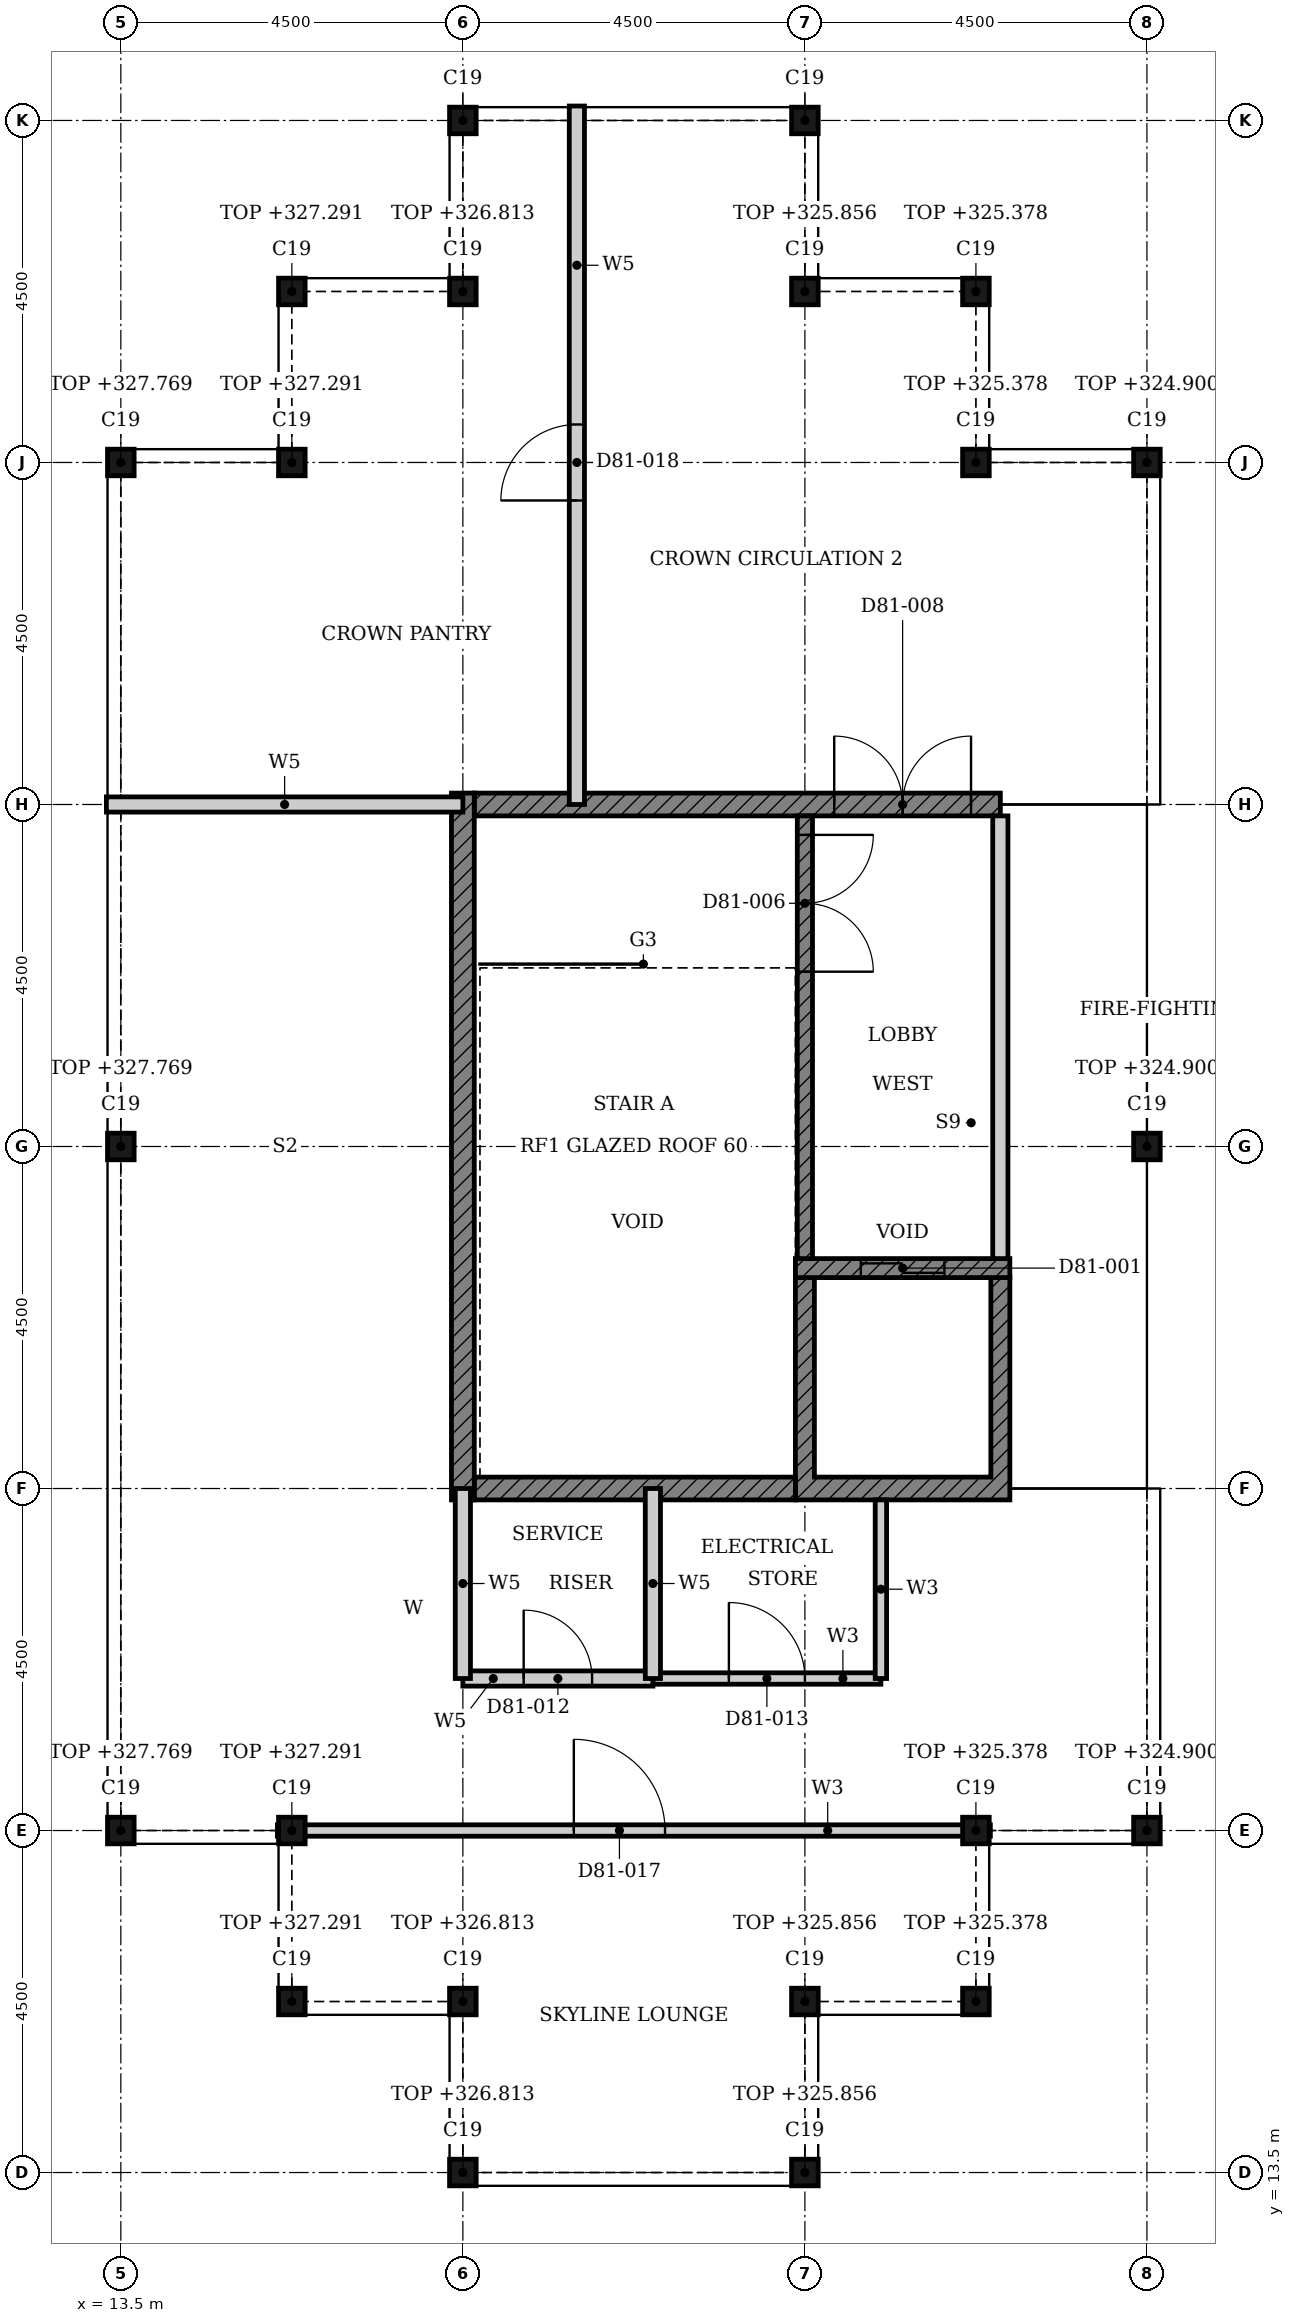
"""IFC4 building model, lengths in metres.
Left out: names, types, materials, properties, quantities, classifications, styles, units other than length and angle.
Written with IfcOpenShell. Run it as: python <this file> out.ifc"""

import sys

from ifc_helpers import new_model, si_unit, direction, frame, frame_2d, origin, origin_2d, place, context, subcontext, project, spatial, polyline, rectangle, i_section, outline, extrude, element, fill, save


model = new_model("IFC4")
c1 = context("Model", 3, precision=1e-05, world=origin(), true_north=direction((0.0, 1.0)))
c2 = subcontext(c1, "Body", "Model", "MODEL_VIEW")
j1 = project(units=[si_unit("LENGTHUNIT", "METRE"), si_unit("PLANEANGLEUNIT", "RADIAN")], contexts=[c1])
p1 = place(None, origin())
s1 = spatial("IfcSite", under=j1, at=p1, CompositionType="ELEMENT")
p2 = place(p1, origin())
s2 = spatial("IfcBuilding", under=s1, at=p2, CompositionType="ELEMENT")
p3 = place(p2, frame((0.0, 0.0, 321.2)))
s3 = spatial("IfcBuildingStorey", under=s2, at=p3, CompositionType="ELEMENT", Elevation=321.2)
for number, where, z_axis, x_axis in (
    (1, (22.5, 13.5, 0.0), (0.0, 0.0, 1.0), (1.0, 0.0, 0.0)),
    (2, (22.5, 15.75, 0.0), (0.0, 0.0, 1.0), (1.0, 0.0, 0.0)),
):
    element("IfcColumn", number, at=place(p3, frame(where, z_axis=z_axis, x_axis=x_axis)), inside=s3, PredefinedType="COLUMN", context=c2, shape_type="SweptSolid", body=[
        extrude(i_section(OverallWidth=0.35, OverallDepth=0.35, WebThickness=0.012, FlangeThickness=0.019, FilletRadius=0.013, at=origin_2d()), origin(), (0.0, 0.0, 1.0), 4.656),
    ])
for number, where, z_axis, x_axis in (
    (3, (24.75, 15.75, 0.0), (0.0, 0.0, 1.0), (1.0, 0.0, 0.0)),
    (4, (24.75, 18.0, 0.0), (0.0, 0.0, 1.0), (1.0, 0.0, 0.0)),
):
    element("IfcColumn", number, at=place(p3, frame(where, z_axis=z_axis, x_axis=x_axis)), inside=s3, PredefinedType="COLUMN", context=c2, shape_type="SweptSolid", body=[
        extrude(i_section(OverallWidth=0.35, OverallDepth=0.35, WebThickness=0.012, FlangeThickness=0.019, FilletRadius=0.013, at=origin_2d()), origin(), (0.0, 0.0, 1.0), 4.178),
    ])
for number, where, z_axis, x_axis in (
    (5, (27.0, 18.0, 0.0), (0.0, 0.0, 1.0), (1.0, 0.0, 0.0)),
    (6, (27.0, 27.0, 0.0), (0.0, 0.0, 1.0), (1.0, 0.0, 0.0)),
    (7, (27.0, 36.0, 0.0), (0.0, 0.0, 1.0), (1.0, 0.0, 0.0)),
):
    element("IfcColumn", number, at=place(p3, frame(where, z_axis=z_axis, x_axis=x_axis)), inside=s3, PredefinedType="COLUMN", context=c2, shape_type="SweptSolid", body=[
        extrude(i_section(OverallWidth=0.35, OverallDepth=0.35, WebThickness=0.012, FlangeThickness=0.019, FilletRadius=0.013, at=origin_2d()), origin(), (0.0, 0.0, 1.0), 3.7),
    ])
for number, where, z_axis, x_axis in (
    (8, (24.75, 36.0, 0.0), (0.0, 0.0, 1.0), (1.0, 0.0, 0.0)),
    (9, (24.75, 38.25, 0.0), (0.0, 0.0, 1.0), (1.0, 0.0, 0.0)),
):
    element("IfcColumn", number, at=place(p3, frame(where, z_axis=z_axis, x_axis=x_axis)), inside=s3, PredefinedType="COLUMN", context=c2, shape_type="SweptSolid", body=[
        extrude(i_section(OverallWidth=0.35, OverallDepth=0.35, WebThickness=0.012, FlangeThickness=0.019, FilletRadius=0.013, at=origin_2d()), origin(), (0.0, 0.0, 1.0), 4.178),
    ])
for number, where, z_axis, x_axis in (
    (10, (22.5, 38.25, 0.0), (0.0, 0.0, 1.0), (1.0, 0.0, 0.0)),
    (11, (22.5, 40.5, 0.0), (0.0, 0.0, 1.0), (1.0, 0.0, 0.0)),
):
    element("IfcColumn", number, at=place(p3, frame(where, z_axis=z_axis, x_axis=x_axis)), inside=s3, PredefinedType="COLUMN", context=c2, shape_type="SweptSolid", body=[
        extrude(i_section(OverallWidth=0.35, OverallDepth=0.35, WebThickness=0.012, FlangeThickness=0.019, FilletRadius=0.013, at=origin_2d()), origin(), (0.0, 0.0, 1.0), 4.656),
    ])
for number, where, z_axis, x_axis in (
    (12, (18.0, 40.5, 0.0), (0.0, 0.0, 1.0), (1.0, 0.0, 0.0)),
    (13, (18.0, 38.25, 0.0), (0.0, 0.0, 1.0), (1.0, 0.0, 0.0)),
):
    element("IfcColumn", number, at=place(p3, frame(where, z_axis=z_axis, x_axis=x_axis)), inside=s3, PredefinedType="COLUMN", context=c2, shape_type="SweptSolid", body=[
        extrude(i_section(OverallWidth=0.35, OverallDepth=0.35, WebThickness=0.012, FlangeThickness=0.019, FilletRadius=0.013, at=origin_2d()), origin(), (0.0, 0.0, 1.0), 5.613),
    ])
for number, where, z_axis, x_axis in (
    (14, (15.75, 38.25, 0.0), (0.0, 0.0, 1.0), (1.0, 0.0, 0.0)),
    (15, (15.75, 36.0, 0.0), (0.0, 0.0, 1.0), (1.0, 0.0, 0.0)),
):
    element("IfcColumn", number, at=place(p3, frame(where, z_axis=z_axis, x_axis=x_axis)), inside=s3, PredefinedType="COLUMN", context=c2, shape_type="SweptSolid", body=[
        extrude(i_section(OverallWidth=0.35, OverallDepth=0.35, WebThickness=0.012, FlangeThickness=0.019, FilletRadius=0.013, at=origin_2d()), origin(), (0.0, 0.0, 1.0), 6.091),
    ])
for number, where, z_axis, x_axis in (
    (16, (13.5, 36.0, 0.0), (0.0, 0.0, 1.0), (1.0, 0.0, 0.0)),
    (17, (13.5, 27.0, 0.0), (0.0, 0.0, 1.0), (1.0, 0.0, 0.0)),
    (18, (13.5, 18.0, 0.0), (0.0, 0.0, 1.0), (1.0, 0.0, 0.0)),
):
    element("IfcColumn", number, at=place(p3, frame(where, z_axis=z_axis, x_axis=x_axis)), inside=s3, PredefinedType="COLUMN", context=c2, shape_type="SweptSolid", body=[
        extrude(i_section(OverallWidth=0.35, OverallDepth=0.35, WebThickness=0.012, FlangeThickness=0.019, FilletRadius=0.013, at=origin_2d()), origin(), (0.0, 0.0, 1.0), 6.57),
    ])
for number, where, z_axis, x_axis in (
    (19, (15.75, 18.0, 0.0), (0.0, 0.0, 1.0), (1.0, 0.0, 0.0)),
    (20, (15.75, 15.75, 0.0), (0.0, 0.0, 1.0), (1.0, 0.0, 0.0)),
):
    element("IfcColumn", number, at=place(p3, frame(where, z_axis=z_axis, x_axis=x_axis)), inside=s3, PredefinedType="COLUMN", context=c2, shape_type="SweptSolid", body=[
        extrude(i_section(OverallWidth=0.35, OverallDepth=0.35, WebThickness=0.012, FlangeThickness=0.019, FilletRadius=0.013, at=origin_2d()), origin(), (0.0, 0.0, 1.0), 6.091),
    ])
for number, where, z_axis, x_axis in (
    (21, (18.0, 15.75, 0.0), (0.0, 0.0, 1.0), (1.0, 0.0, 0.0)),
    (22, (18.0, 13.5, 0.0), (0.0, 0.0, 1.0), (1.0, 0.0, 0.0)),
):
    element("IfcColumn", number, at=place(p3, frame(where, z_axis=z_axis, x_axis=x_axis)), inside=s3, PredefinedType="COLUMN", context=c2, shape_type="SweptSolid", body=[
        extrude(i_section(OverallWidth=0.35, OverallDepth=0.35, WebThickness=0.012, FlangeThickness=0.019, FilletRadius=0.013, at=origin_2d()), origin(), (0.0, 0.0, 1.0), 5.613),
    ])
p4 = place(p3, origin())
e23 = element("IfcWall", 23, at=p4, inside=s3, PredefinedType="SHEAR", context=c2, shape_type="SweptSolid", body=[
    extrude(outline(polyline([(22.375, 22.35), (25.197, 22.35), (25.197, 25.275), (24.947, 25.275), (24.947, 22.65), (22.625, 22.65), (22.625, 25.275), (22.375, 25.275), (22.375, 22.35)])), origin(), (0.0, 0.0, 1.0), 3.9),
])
p5 = place(p3, frame((18.15, 22.5, 0.0), z_axis=(0.0, 0.0, 1.0), x_axis=(1.0, 0.0, 0.0)))
e24 = element("IfcWall", 24, at=p5, inside=s3, PredefinedType="SHEAR", context=c2, shape_type="SweptSolid", body=[
    extrude(rectangle(XDim=4.225, YDim=0.3, at=frame_2d((2.113, 0.0))), origin(), (0.0, 0.0, 1.0), 3.9),
])
p6 = place(p3, frame((18.15, 31.5, 0.0), z_axis=(0.0, 0.0, 1.0), x_axis=(1.0, 0.0, 0.0)))
e25 = element("IfcWall", 25, at=p6, inside=s3, PredefinedType="SHEAR", context=c2, shape_type="SweptSolid", body=[
    extrude(rectangle(XDim=6.922, YDim=0.3, at=frame_2d((3.461, 0.0))), origin(), (0.0, 0.0, 1.0), 3.9),
])
p7 = place(p6, frame((4.736, 0.0, 0.0)))
e26 = element("IfcOpeningElement", 26, at=p7, cuts=e25, PredefinedType="OPENING", context=c2, shape_type="SweptSolid", body=[
    extrude(rectangle(XDim=1.8, YDim=2.1, at=frame_2d((0.9, 1.05))), frame((0.0, 0.16, 0.0), z_axis=(0.0, -1.0, 0.0), x_axis=(1.0, 0.0, 0.0)), (0.0, 0.0, 1.0), 0.32),
])
p8 = place(p3, frame((18.0, 22.35, 0.0), z_axis=(0.0, 0.0, 1.0), x_axis=(0.0, 1.0, 0.0)))
e27 = element("IfcWall", 27, at=p8, inside=s3, PredefinedType="SHEAR", context=c2, shape_type="SweptSolid", body=[
    extrude(rectangle(XDim=9.3, YDim=0.3, at=frame_2d((4.65, 0.0))), origin(), (0.0, 0.0, 1.0), 3.9),
])
p9 = place(p3, frame((22.375, 25.4, 0.0), z_axis=(0.0, 0.0, 1.0), x_axis=(1.0, 0.0, 0.0)))
e28 = element("IfcWall", 28, at=p9, inside=s3, PredefinedType="SHEAR", context=c2, shape_type="SweptSolid", body=[
    extrude(rectangle(XDim=2.822, YDim=0.25, at=frame_2d((1.411, 0.0))), origin(), (0.0, 0.0, 1.0), 3.9),
])
p10 = place(p9, frame((0.861, 0.0, 0.0)))
e29 = element("IfcOpeningElement", 29, at=p10, cuts=e28, PredefinedType="OPENING", context=c2, shape_type="SweptSolid", body=[
    extrude(rectangle(XDim=1.1, YDim=2.1, at=frame_2d((0.55, 1.05))), frame((0.0, 0.135, 0.0), z_axis=(0.0, -1.0, 0.0), x_axis=(1.0, 0.0, 0.0)), (0.0, 0.0, 1.0), 0.27),
])
p11 = place(p3, frame((22.5, 31.35, 0.0), z_axis=(0.0, 0.0, 1.0), x_axis=(0.0, -1.0, 0.0)))
e30 = element("IfcWall", 30, at=p11, inside=s3, PredefinedType="SHEAR", context=c2, shape_type="SweptSolid", body=[
    extrude(rectangle(XDim=5.825, YDim=0.2, at=frame_2d((2.913, 0.0))), origin(), (0.0, 0.0, 1.0), 3.9),
])
p12 = place(p11, frame((0.25, 0.0, 0.0)))
e31 = element("IfcOpeningElement", 31, at=p12, cuts=e30, PredefinedType="OPENING", context=c2, shape_type="SweptSolid", body=[
    extrude(rectangle(XDim=1.8, YDim=2.1, at=frame_2d((0.9, 1.05))), frame((0.0, 0.11, 0.0), z_axis=(0.0, -1.0, 0.0), x_axis=(1.0, 0.0, 0.0)), (0.0, 0.0, 1.0), 0.22),
])
p13 = place(p3, frame((25.072, 25.525, 0.0), z_axis=(0.0, 0.0, 1.0), x_axis=(0.0, 1.0, 0.0)))
e32 = element("IfcWall", 32, at=p13, inside=s3, PredefinedType="PARTITIONING", context=c2, shape_type="SweptSolid", body=[
    extrude(rectangle(XDim=5.825, YDim=0.2, at=frame_2d((2.913, 0.0))), origin(), (0.0, 0.0, 1.0), 3.9),
])
p14 = place(p3, frame((15.56, 18.0, 0.0), z_axis=(0.0, 0.0, 1.0), x_axis=(1.0, 0.0, 0.0)))
e33 = element("IfcWall", 33, at=p14, inside=s3, PredefinedType="PARTITIONING", context=c2, shape_type="SweptSolid", body=[
    extrude(rectangle(XDim=9.38, YDim=0.15, at=frame_2d((4.69, 0.0))), origin(), (0.0, 0.0, 1.0), 3.9),
])
p15 = place(p14, frame((3.9, 0.0, 0.0)))
e34 = element("IfcOpeningElement", 34, at=p15, cuts=e33, PredefinedType="OPENING", context=c2, shape_type="SweptSolid", body=[
    extrude(rectangle(XDim=1.2, YDim=2.4, at=frame_2d((0.6, 1.2))), frame((0.0, 0.085, 0.0), z_axis=(0.0, -1.0, 0.0), x_axis=(1.0, 0.0, 0.0)), (0.0, 0.0, 1.0), 0.17),
])
p16 = place(p3, frame((20.5, 20.0, 0.0), z_axis=(0.0, 0.0, 1.0), x_axis=(1.0, 0.0, 0.0)))
e35 = element("IfcWall", 35, at=p16, inside=s3, PredefinedType="PARTITIONING", context=c2, shape_type="SweptSolid", body=[
    extrude(rectangle(XDim=3.0, YDim=0.15, at=frame_2d((1.5, 0.0))), origin(), (0.0, 0.0, 1.0), 3.9),
])
p17 = place(p16, frame((1.0, 0.0, 0.0)))
e36 = element("IfcOpeningElement", 36, at=p17, cuts=e35, PredefinedType="OPENING", context=c2, shape_type="SweptSolid", body=[
    extrude(rectangle(XDim=1.0, YDim=2.1, at=frame_2d((0.5, 1.05))), frame((0.0, 0.085, 0.0), z_axis=(0.0, -1.0, 0.0), x_axis=(1.0, 0.0, 0.0)), (0.0, 0.0, 1.0), 0.17),
])
p18 = place(p3, frame((23.5, 20.0, 0.0), z_axis=(0.0, 0.0, 1.0), x_axis=(0.0, 1.0, 0.0)))
e37 = element("IfcWall", 37, at=p18, inside=s3, PredefinedType="PARTITIONING", context=c2, shape_type="SweptSolid", body=[
    extrude(rectangle(XDim=2.35, YDim=0.15, at=frame_2d((1.175, 0.0))), origin(), (0.0, 0.0, 1.0), 3.9),
])
p19 = place(p3, frame((18.0, 20.0, 0.0), z_axis=(0.0, 0.0, 1.0), x_axis=(1.0, 0.0, 0.0)))
e38 = element("IfcWall", 38, at=p19, inside=s3, PredefinedType="PARTITIONING", context=c2, shape_type="SweptSolid", body=[
    extrude(rectangle(XDim=2.5, YDim=0.2, at=frame_2d((1.25, 0.0))), origin(), (0.0, 0.0, 1.0), 3.9),
])
p20 = place(p19, frame((0.8, 0.0, 0.0)))
e39 = element("IfcOpeningElement", 39, at=p20, cuts=e38, PredefinedType="OPENING", context=c2, shape_type="SweptSolid", body=[
    extrude(rectangle(XDim=0.9, YDim=2.1, at=frame_2d((0.45, 1.05))), frame((0.0, 0.11, 0.0), z_axis=(0.0, -1.0, 0.0), x_axis=(1.0, 0.0, 0.0)), (0.0, 0.0, 1.0), 0.22),
])
p21 = place(p3, frame((13.31, 31.5, 0.0), z_axis=(0.0, 0.0, 1.0), x_axis=(1.0, 0.0, 0.0)))
e40 = element("IfcWall", 40, at=p21, inside=s3, PredefinedType="PARTITIONING", context=c2, shape_type="SweptSolid", body=[
    extrude(rectangle(XDim=4.69, YDim=0.2, at=frame_2d((2.345, 0.0))), origin(), (0.0, 0.0, 1.0), 3.9),
])
p22 = place(p3, frame((18.0, 20.0, 0.0), z_axis=(0.0, 0.0, 1.0), x_axis=(0.0, 1.0, 0.0)))
e41 = element("IfcWall", 41, at=p22, inside=s3, PredefinedType="PARTITIONING", context=c2, shape_type="SweptSolid", body=[
    extrude(rectangle(XDim=2.5, YDim=0.2, at=frame_2d((1.25, 0.0))), origin(), (0.0, 0.0, 1.0), 3.9),
])
p23 = place(p3, frame((19.5, 31.5, 0.0), z_axis=(0.0, 0.0, 1.0), x_axis=(0.0, 1.0, 0.0)))
e42 = element("IfcWall", 42, at=p23, inside=s3, PredefinedType="PARTITIONING", context=c2, shape_type="SweptSolid", body=[
    extrude(rectangle(XDim=9.19, YDim=0.2, at=frame_2d((4.595, 0.0))), origin(), (0.0, 0.0, 1.0), 3.9),
])
p24 = place(p23, frame((4.0, 0.0, 0.0)))
e43 = element("IfcOpeningElement", 43, at=p24, cuts=e42, PredefinedType="OPENING", context=c2, shape_type="SweptSolid", body=[
    extrude(rectangle(XDim=1.0, YDim=2.1, at=frame_2d((0.5, 1.05))), frame((0.0, 0.11, 0.0), z_axis=(0.0, -1.0, 0.0), x_axis=(1.0, 0.0, 0.0)), (0.0, 0.0, 1.0), 0.22),
])
p25 = place(p3, frame((20.5, 20.0, 0.0), z_axis=(0.0, 0.0, 1.0), x_axis=(0.0, 1.0, 0.0)))
e44 = element("IfcWall", 44, at=p25, inside=s3, PredefinedType="PARTITIONING", context=c2, shape_type="SweptSolid", body=[
    extrude(rectangle(XDim=2.5, YDim=0.2, at=frame_2d((1.25, 0.0))), origin(), (0.0, 0.0, 1.0), 3.9),
])
p26 = place(p10, origin())
e45 = element("IfcDoor", 45, at=p26, inside=s3, OperationType="DOUBLE_DOOR_SLIDING", PredefinedType="DOOR", context=c2, shape_type="SweptSolid", body=[
    extrude(rectangle(XDim=1.1, YDim=2.1, at=frame_2d((0.55, 1.05))), frame((0.0, 0.025, 0.0), z_axis=(0.0, -1.0, 0.0), x_axis=(1.0, 0.0, 0.0)), (0.0, 0.0, 1.0), 0.05),
])
fill(e29, e45)
p27 = place(p12, origin())
e46 = element("IfcDoor", 46, at=p27, inside=s3, OperationType="DOUBLE_DOOR_SINGLE_SWING", PredefinedType="DOOR", context=c2, shape_type="SweptSolid", body=[
    extrude(rectangle(XDim=1.8, YDim=2.1, at=frame_2d((0.9, 1.05))), frame((0.0, 0.025, 0.0), z_axis=(0.0, -1.0, 0.0), x_axis=(1.0, 0.0, 0.0)), (0.0, 0.0, 1.0), 0.05),
])
fill(e31, e46)
p28 = place(p7, origin())
e47 = element("IfcDoor", 47, at=p28, inside=s3, OperationType="DOUBLE_DOOR_SINGLE_SWING", PredefinedType="DOOR", context=c2, shape_type="SweptSolid", body=[
    extrude(rectangle(XDim=1.8, YDim=2.1, at=frame_2d((0.9, 1.05))), frame((0.0, 0.025, 0.0), z_axis=(0.0, -1.0, 0.0), x_axis=(1.0, 0.0, 0.0)), (0.0, 0.0, 1.0), 0.05),
])
fill(e26, e47)
p29 = place(p20, origin())
e48 = element("IfcDoor", 48, at=p29, inside=s3, OperationType="SINGLE_SWING_LEFT", PredefinedType="DOOR", context=c2, shape_type="SweptSolid", body=[
    extrude(rectangle(XDim=0.9, YDim=2.1, at=frame_2d((0.45, 1.05))), frame((0.0, 0.025, 0.0), z_axis=(0.0, -1.0, 0.0), x_axis=(1.0, 0.0, 0.0)), (0.0, 0.0, 1.0), 0.05),
])
fill(e39, e48)
p30 = place(p17, origin())
e49 = element("IfcDoor", 49, at=p30, inside=s3, OperationType="SINGLE_SWING_LEFT", PredefinedType="DOOR", context=c2, shape_type="SweptSolid", body=[
    extrude(rectangle(XDim=1.0, YDim=2.1, at=frame_2d((0.5, 1.05))), frame((0.0, 0.025, 0.0), z_axis=(0.0, -1.0, 0.0), x_axis=(1.0, 0.0, 0.0)), (0.0, 0.0, 1.0), 0.05),
])
fill(e36, e49)
p31 = place(p15, origin())
e50 = element("IfcDoor", 50, at=p31, inside=s3, OperationType="SINGLE_SWING_LEFT", PredefinedType="DOOR", context=c2, shape_type="SweptSolid", body=[
    extrude(rectangle(XDim=1.2, YDim=2.4, at=frame_2d((0.6, 1.2))), frame((0.0, 0.025, 0.0), z_axis=(0.0, -1.0, 0.0), x_axis=(1.0, 0.0, 0.0)), (0.0, 0.0, 1.0), 0.05),
])
fill(e34, e50)
p32 = place(p24, origin())
e51 = element("IfcDoor", 51, at=p32, inside=s3, OperationType="SINGLE_SWING_RIGHT", PredefinedType="DOOR", context=c2, shape_type="SweptSolid", body=[
    extrude(rectangle(XDim=1.0, YDim=2.1, at=frame_2d((0.5, 1.05))), frame((0.0, 0.025, 0.0), z_axis=(0.0, -1.0, 0.0), x_axis=(1.0, 0.0, 0.0)), (0.0, 0.0, 1.0), 0.05),
])
fill(e43, e51)
save(model, sys.argv[1])
